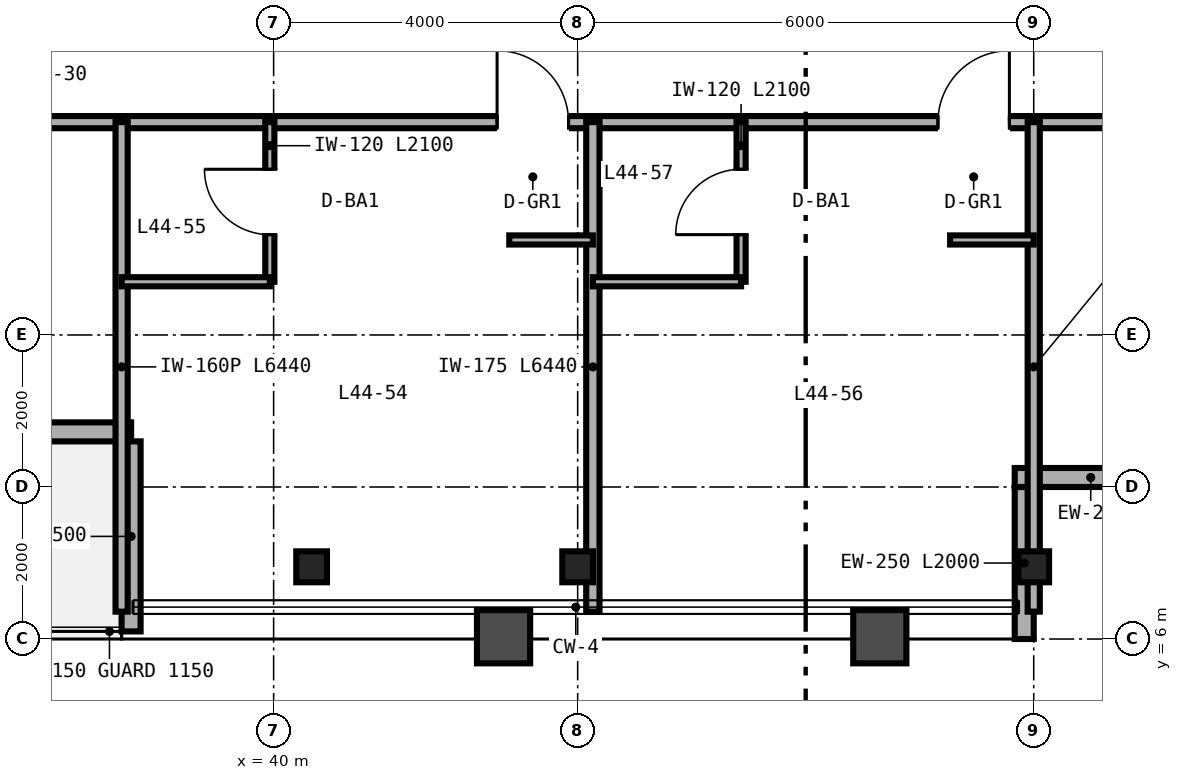
"""IFC4 building model, lengths in metres.
Left out: names, types, materials, properties, quantities, classifications, styles, units other than length and angle.
Written with IfcOpenShell. Run it as: python <this file> out.ifc"""

import sys

from ifc_helpers import new_model, si_unit, direction, frame, frame_2d, origin, origin_2d, place, context, subcontext, project, spatial, rectangle, i_section, extrude, source, transform, mapped, element, fill, save


model = new_model("IFC4")
c1 = context("Model", 3, precision=1e-05, world=origin(), true_north=direction((0.0, 1.0)))
c2 = subcontext(c1, "Body", "Model", "MODEL_VIEW")
j1 = project(units=[si_unit("LENGTHUNIT", "METRE"), si_unit("PLANEANGLEUNIT", "RADIAN")], contexts=[c1])
p1 = place(None, origin())
s1 = spatial("IfcSite", under=j1, at=p1, CompositionType="ELEMENT")
p2 = place(p1, origin())
s2 = spatial("IfcBuilding", under=s1, at=p2, CompositionType="ELEMENT")
p3 = place(p2, frame((0.0, 0.0, 177.6)))
s3 = spatial("IfcBuildingStorey", under=s2, at=p3, CompositionType="ELEMENT", Elevation=177.6)
m1 = source(origin(), c2, "Body", "SweptSolid", [
    extrude(i_section(OverallWidth=0.404, OverallDepth=0.407, WebThickness=0.027, FlangeThickness=0.044, FilletRadius=0.025, at=origin_2d()), origin(), (0.0, 0.0, 1.0), 3.37),
])
for number, where, z_axis, x_axis in (
    (1, (40.5, 6.95, 0.0), (0.0, 0.0, 1.0), (1.0, 0.0, 0.0)),
    (2, (44.0, 6.95, 0.0), (0.0, 0.0, 1.0), (1.0, 0.0, 0.0)),
    (3, (50.0, 6.95, 0.0), (0.0, 0.0, 1.0), (1.0, 0.0, 0.0)),
):
    element("IfcColumn", number, at=place(p3, frame(where, z_axis=z_axis, x_axis=x_axis)), inside=s3, PredefinedType="COLUMN", context=c2, shape_type="MappedRepresentation", body=[
        mapped(m1, transform((0.0, 0.0, 0.0), scale=1.0)),
    ])
p4 = place(p3, frame((49.875, 6.0, 0.0), z_axis=(0.0, 0.0, 1.0), x_axis=(0.0, 1.0, 0.0)))
e4 = element("IfcWall", 4, at=p4, inside=s3, PredefinedType="SOLIDWALL", context=c2, shape_type="SweptSolid", body=[
    extrude(rectangle(XDim=2.0, YDim=0.25, at=frame_2d((1.0, 0.0))), origin(), (0.0, 0.0, 1.0), 2.677),
])
p5 = place(p3, frame((49.75, 8.125, 0.0), z_axis=(0.0, 0.0, 1.0), x_axis=(1.0, 0.0, 0.0)))
e5 = element("IfcWall", 5, at=p5, inside=s3, PredefinedType="SOLIDWALL", context=c2, shape_type="SweptSolid", body=[
    extrude(rectangle(XDim=2.0, YDim=0.25, at=frame_2d((1.0, 0.0))), origin(), (0.0, 0.0, 1.0), 3.37),
])
p6 = place(p3, frame((25.875, 8.725, 0.0), z_axis=(0.0, 0.0, 1.0), x_axis=(1.0, 0.0, 0.0)))
e6 = element("IfcWall", 6, at=p6, inside=s3, PredefinedType="SOLIDWALL", context=c2, shape_type="SweptSolid", body=[
    extrude(rectangle(XDim=12.25, YDim=0.25, at=frame_2d((6.125, 0.0))), origin(), (0.0, 0.0, 1.0), 3.37),
])
p7 = place(p6, frame((5.6, 0.0, 0.0)))
e7 = element("IfcOpeningElement", 7, at=p7, cuts=e6, PredefinedType="OPENING", context=c2, shape_type="SweptSolid", body=[
    extrude(rectangle(XDim=1.05, YDim=2.15, at=frame_2d((0.525, 1.075))), frame((0.0, 0.135, 0.0), z_axis=(0.0, -1.0, 0.0), x_axis=(1.0, 0.0, 0.0)), (0.0, 0.0, 1.0), 0.27),
])
p8 = place(p3, frame((38.125, 6.1, 0.0), z_axis=(0.0, 0.0, 1.0), x_axis=(0.0, 1.0, 0.0)))
e8 = element("IfcWall", 8, at=p8, inside=s3, PredefinedType="SOLIDWALL", context=c2, shape_type="SweptSolid", body=[
    extrude(rectangle(XDim=2.5, YDim=0.25, at=frame_2d((1.25, 0.0))), origin(), (0.0, 0.0, 1.0), 2.443),
])
p9 = place(p3, frame((50.0, 12.8, 0.0), z_axis=(0.0, 0.0, 1.0), x_axis=(1.0, 0.0, 0.0)))
e9 = element("IfcWall", 9, at=p9, inside=s3, PredefinedType="PARTITIONING", context=c2, shape_type="SweptSolid", body=[
    extrude(rectangle(XDim=4.0, YDim=0.16, at=frame_2d((2.0, 0.0))), origin(), (0.0, 0.0, 1.0), 3.37),
])
p10 = place(p9, frame((1.52, 0.0, 0.0)))
e10 = element("IfcOpeningElement", 10, at=p10, cuts=e9, PredefinedType="OPENING", context=c2, shape_type="SweptSolid", body=[
    extrude(rectangle(XDim=0.96, YDim=2.15, at=frame_2d((0.48, 1.075))), frame((0.0, 0.09, 0.0), z_axis=(0.0, -1.0, 0.0), x_axis=(1.0, 0.0, 0.0)), (0.0, 0.0, 1.0), 0.18),
])
p11 = place(p3, frame((26.0, 12.8, 0.0), z_axis=(0.0, 0.0, 1.0), x_axis=(1.0, 0.0, 0.0)))
e11 = element("IfcWall", 11, at=p11, inside=s3, PredefinedType="PARTITIONING", context=c2, shape_type="SweptSolid", body=[
    extrude(rectangle(XDim=12.0, YDim=0.16, at=frame_2d((6.0, 0.0))), origin(), (0.0, 0.0, 1.0), 3.37),
])
p12 = place(p11, frame((5.2, 0.0, 0.0)))
e12 = element("IfcOpeningElement", 12, at=p12, cuts=e11, PredefinedType="OPENING", context=c2, shape_type="SweptSolid", body=[
    extrude(rectangle(XDim=0.96, YDim=2.15, at=frame_2d((0.48, 1.075))), frame((0.0, 0.09, 0.0), z_axis=(0.0, -1.0, 0.0), x_axis=(1.0, 0.0, 0.0)), (0.0, 0.0, 1.0), 0.18),
])
p13 = place(p3, frame((38.0, 12.8, 0.0), z_axis=(0.0, 0.0, 1.0), x_axis=(1.0, 0.0, 0.0)))
e13 = element("IfcWall", 13, at=p13, inside=s3, PredefinedType="PARTITIONING", context=c2, shape_type="SweptSolid", body=[
    extrude(rectangle(XDim=12.0, YDim=0.16, at=frame_2d((6.0, 0.0))), origin(), (0.0, 0.0, 1.0), 2.913),
])
p14 = place(p13, frame((4.94, 0.0, 0.0)))
e14 = element("IfcOpeningElement", 14, at=p14, cuts=e13, PredefinedType="OPENING", context=c2, shape_type="SweptSolid", body=[
    extrude(rectangle(XDim=0.94, YDim=2.15, at=frame_2d((0.47, 1.075))), frame((0.0, 0.09, 0.0), z_axis=(0.0, -1.0, 0.0), x_axis=(1.0, 0.0, 0.0)), (0.0, 0.0, 1.0), 0.18),
])
p15 = place(p13, frame((10.74, 0.0, 0.0)))
e15 = element("IfcOpeningElement", 15, at=p15, cuts=e13, PredefinedType="OPENING", context=c2, shape_type="SweptSolid", body=[
    extrude(rectangle(XDim=0.94, YDim=2.15, at=frame_2d((0.47, 1.075))), frame((0.0, 0.09, 0.0), z_axis=(0.0, -1.0, 0.0), x_axis=(1.0, 0.0, 0.0)), (0.0, 0.0, 1.0), 0.18),
])
p16 = place(p3, frame((38.0, 6.36, 0.0), z_axis=(0.0, 0.0, 1.0), x_axis=(0.0, 1.0, 0.0)))
e16 = element("IfcWall", 16, at=p16, inside=s3, PredefinedType="PARTITIONING", context=c2, shape_type="SweptSolid", body=[
    extrude(rectangle(XDim=6.44, YDim=0.16, at=frame_2d((3.22, 0.0))), origin(), (0.0, 0.0, 1.0), 2.443),
])
p17 = place(p3, frame((50.0, 6.36, 0.0), z_axis=(0.0, 0.0, 1.0), x_axis=(0.0, 1.0, 0.0)))
e17 = element("IfcWall", 17, at=p17, inside=s3, PredefinedType="PARTITIONING", context=c2, shape_type="SweptSolid", body=[
    extrude(rectangle(XDim=6.44, YDim=0.16, at=frame_2d((3.22, 0.0))), origin(), (0.0, 0.0, 1.0), 2.677),
])
p18 = place(p3, frame((44.2, 6.36, 0.0), z_axis=(0.0, 0.0, 1.0), x_axis=(0.0, 1.0, 0.0)))
e18 = element("IfcWall", 18, at=p18, inside=s3, PredefinedType="PARTITIONING", context=c2, shape_type="SweptSolid", body=[
    extrude(rectangle(XDim=6.44, YDim=0.175, at=frame_2d((3.22, 0.0))), origin(), (0.0, 0.0, 1.0), 2.677),
])
p19 = place(p3, frame((39.95, 10.7, 0.0), z_axis=(0.0, 0.0, 1.0), x_axis=(0.0, 1.0, 0.0)))
e19 = element("IfcWall", 19, at=p19, inside=s3, PredefinedType="PARTITIONING", context=c2, shape_type="SweptSolid", body=[
    extrude(rectangle(XDim=2.1, YDim=0.12, at=frame_2d((1.05, 0.0))), origin(), (0.0, 0.0, 1.0), 3.37),
])
p20 = place(p19, frame((0.62, 0.0, 0.0)))
e20 = element("IfcOpeningElement", 20, at=p20, cuts=e19, PredefinedType="OPENING", context=c2, shape_type="SweptSolid", body=[
    extrude(rectangle(XDim=0.86, YDim=2.1, at=frame_2d((0.43, 1.05))), frame((0.0, 0.07, 0.0), z_axis=(0.0, -1.0, 0.0), x_axis=(1.0, 0.0, 0.0)), (0.0, 0.0, 1.0), 0.14),
])
p21 = place(p3, frame((38.0, 10.7, 0.0), z_axis=(0.0, 0.0, 1.0), x_axis=(1.0, 0.0, 0.0)))
e21 = element("IfcWall", 21, at=p21, inside=s3, PredefinedType="PARTITIONING", context=c2, shape_type="SweptSolid", body=[
    extrude(rectangle(XDim=1.95, YDim=0.12, at=frame_2d((0.975, 0.0))), origin(), (0.0, 0.0, 1.0), 3.37),
])
p22 = place(p3, frame((43.1, 11.25, 0.0), z_axis=(0.0, 0.0, 1.0), x_axis=(1.0, 0.0, 0.0)))
e22 = element("IfcWall", 22, at=p22, inside=s3, PredefinedType="PARTITIONING", context=c2, shape_type="SweptSolid", body=[
    extrude(rectangle(XDim=1.1, YDim=0.12, at=frame_2d((0.55, 0.0))), origin(), (0.0, 0.0, 1.0), 3.37),
])
p23 = place(p3, frame((46.15, 10.7, 0.0), z_axis=(0.0, 0.0, 1.0), x_axis=(0.0, 1.0, 0.0)))
e23 = element("IfcWall", 23, at=p23, inside=s3, PredefinedType="PARTITIONING", context=c2, shape_type="SweptSolid", body=[
    extrude(rectangle(XDim=2.1, YDim=0.12, at=frame_2d((1.05, 0.0))), origin(), (0.0, 0.0, 1.0), 3.37),
])
p24 = place(p23, frame((0.62, 0.0, 0.0)))
e24 = element("IfcOpeningElement", 24, at=p24, cuts=e23, PredefinedType="OPENING", context=c2, shape_type="SweptSolid", body=[
    extrude(rectangle(XDim=0.86, YDim=2.1, at=frame_2d((0.43, 1.05))), frame((0.0, 0.07, 0.0), z_axis=(0.0, -1.0, 0.0), x_axis=(1.0, 0.0, 0.0)), (0.0, 0.0, 1.0), 0.14),
])
p25 = place(p3, frame((44.2, 10.7, 0.0), z_axis=(0.0, 0.0, 1.0), x_axis=(1.0, 0.0, 0.0)))
e25 = element("IfcWall", 25, at=p25, inside=s3, PredefinedType="PARTITIONING", context=c2, shape_type="SweptSolid", body=[
    extrude(rectangle(XDim=1.95, YDim=0.12, at=frame_2d((0.975, 0.0))), origin(), (0.0, 0.0, 1.0), 3.37),
])
p26 = place(p3, frame((48.9, 11.25, 0.0), z_axis=(0.0, 0.0, 1.0), x_axis=(1.0, 0.0, 0.0)))
e26 = element("IfcWall", 26, at=p26, inside=s3, PredefinedType="PARTITIONING", context=c2, shape_type="SweptSolid", body=[
    extrude(rectangle(XDim=1.1, YDim=0.12, at=frame_2d((0.55, 0.0))), origin(), (0.0, 0.0, 1.0), 3.37),
])
m2 = source(origin(), c2, "Body", "SweptSolid", [
    extrude(rectangle(XDim=0.86, YDim=2.1, at=frame_2d((0.43, 1.05))), frame((0.0, 0.025, 0.0), z_axis=(0.0, -1.0, 0.0), x_axis=(1.0, 0.0, 0.0)), (0.0, 0.0, 1.0), 0.05),
])
p27 = place(p20, origin())
e27 = element("IfcDoor", 27, at=p27, inside=s3, OperationType="SINGLE_SWING_RIGHT", PredefinedType="DOOR", context=c2, shape_type="MappedRepresentation", body=[
    mapped(m2, transform((0.0, 0.0, 0.0), scale=1.0)),
])
fill(e20, e27)
p28 = place(p24, origin())
e28 = element("IfcDoor", 28, at=p28, inside=s3, OperationType="SINGLE_SWING_LEFT", PredefinedType="DOOR", context=c2, shape_type="MappedRepresentation", body=[
    mapped(m2, transform((0.0, 0.0, 0.0), scale=1.0)),
])
fill(e24, e28)
m3 = source(origin(), c2, "Body", "SweptSolid", [
    extrude(rectangle(XDim=0.94, YDim=2.15, at=frame_2d((0.47, 1.075))), frame((0.0, 0.025, 0.0), z_axis=(0.0, -1.0, 0.0), x_axis=(1.0, 0.0, 0.0)), (0.0, 0.0, 1.0), 0.05),
])
p29 = place(p14, origin())
e29 = element("IfcDoor", 29, at=p29, inside=s3, OperationType="SINGLE_SWING_LEFT", PredefinedType="DOOR", context=c2, shape_type="MappedRepresentation", body=[
    mapped(m3, transform((0.0, 0.0, 0.0), scale=1.0)),
])
fill(e14, e29)
p30 = place(p15, origin())
e30 = element("IfcDoor", 30, at=p30, inside=s3, OperationType="SINGLE_SWING_RIGHT", PredefinedType="DOOR", context=c2, shape_type="MappedRepresentation", body=[
    mapped(m3, transform((0.0, 0.0, 0.0), scale=1.0)),
])
fill(e15, e30)
save(model, sys.argv[1])
